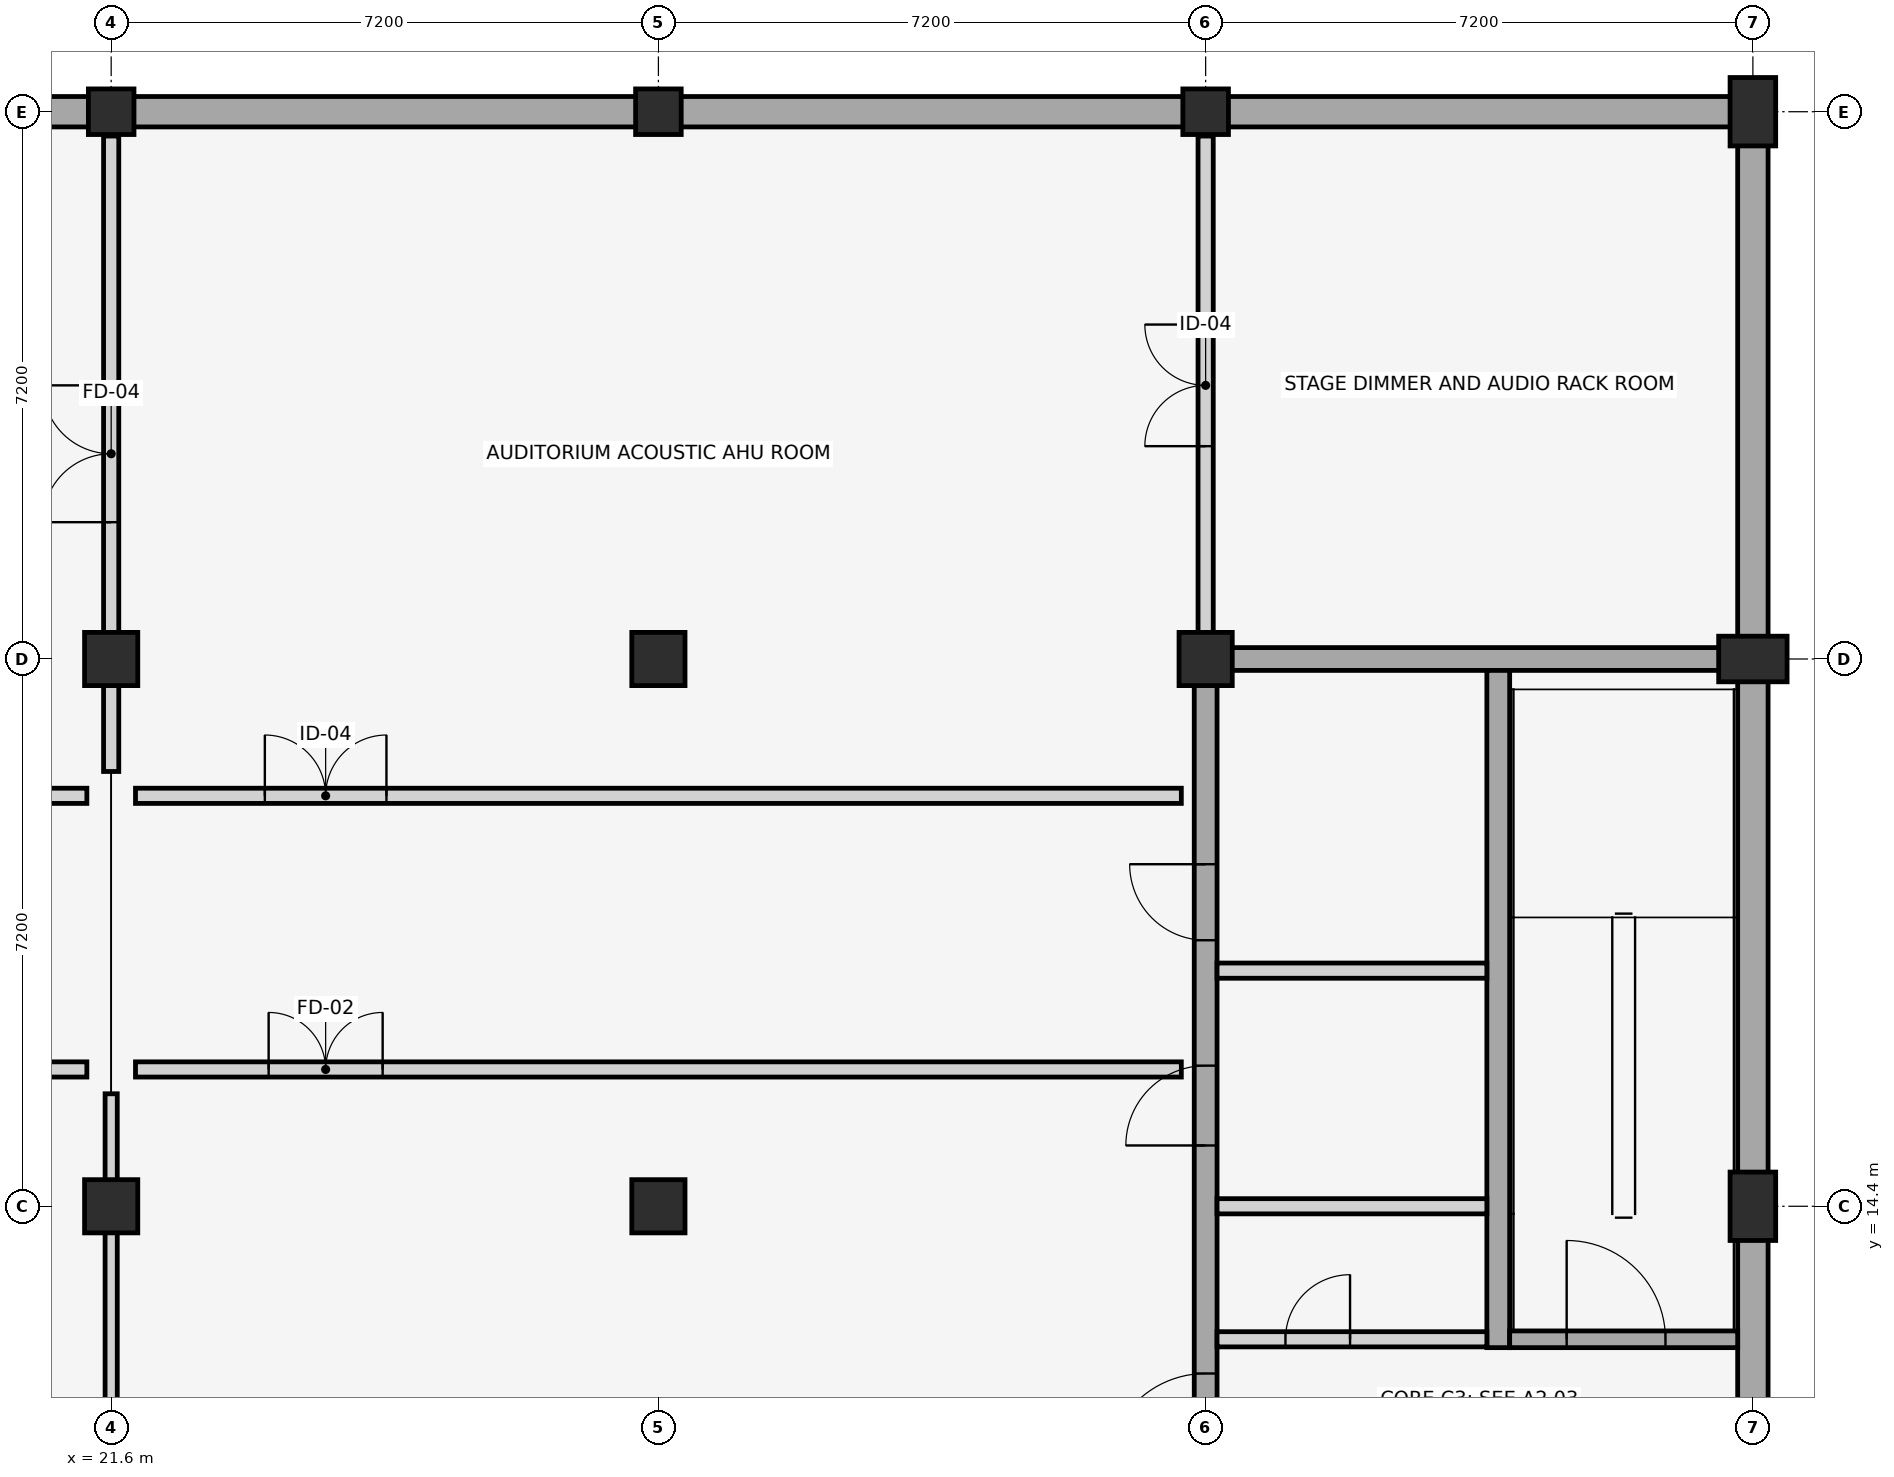
"""IFC4 building model, lengths in metres.
Left out: names, types, materials, properties, quantities, classifications, styles, units other than length and angle.
Written with IfcOpenShell. Run it as: python <this file> out.ifc"""

import sys

from ifc_helpers import new_model, si_unit, direction, frame, frame_2d, origin, origin_2d, place, context, subcontext, project, spatial, rectangle, extrude, element, fill, save


model = new_model("IFC4")
c1 = context("Model", 3, precision=1e-05, world=origin(), true_north=direction((0.0, 1.0)))
c2 = subcontext(c1, "Body", "Model", "MODEL_VIEW")
j1 = project(units=[si_unit("LENGTHUNIT", "METRE"), si_unit("PLANEANGLEUNIT", "RADIAN")], contexts=[c1])
p1 = place(None, origin())
s1 = spatial("IfcSite", under=j1, at=p1, CompositionType="ELEMENT")
p2 = place(p1, origin())
s2 = spatial("IfcBuilding", under=s1, at=p2, CompositionType="ELEMENT")
p3 = place(p2, frame((0.0, 0.0, -4.5)))
s3 = spatial("IfcBuildingStorey", under=s2, at=p3, CompositionType="ELEMENT", Elevation=-4.5)
p4 = place(p3, frame((43.2, 0.2, 0.0), z_axis=(0.0, 0.0, 1.0), x_axis=(0.0, 1.0, 0.0)))
e1 = element("IfcWall", 1, at=p4, inside=s3, PredefinedType="USERDEFINED", context=c2, shape_type="SweptSolid", body=[
    extrude(rectangle(XDim=28.4, YDim=0.4, at=frame_2d((14.2, 0.0))), origin(), (0.0, 0.0, 1.0), 3.67),
])
p5 = place(p3, frame((43.4, 28.8, 0.0), z_axis=(0.0, 0.0, 1.0), x_axis=(-1.0, 0.0, 0.0)))
e2 = element("IfcWall", 2, at=p5, inside=s3, PredefinedType="USERDEFINED", context=c2, shape_type="SweptSolid", body=[
    extrude(rectangle(XDim=43.6, YDim=0.4, at=frame_2d((21.8, 0.0))), origin(), (0.0, 0.0, 1.0), 3.67),
])
for number, where, z_axis, x_axis in (
    (3, (21.6, 14.4, -0.45), (0.0, 0.0, 1.0), (0.0, 1.0, 0.0)),
    (4, (21.6, 21.6, -0.45), (0.0, 0.0, 1.0), (1.0, 0.0, 0.0)),
):
    element("IfcColumn", number, at=place(p3, frame(where, z_axis=z_axis, x_axis=x_axis)), inside=s3, PredefinedType="COLUMN", context=c2, shape_type="SweptSolid", body=[
        extrude(rectangle(XDim=0.7, YDim=0.7, at=origin_2d()), origin(), (0.0, 0.0, 1.0), 4.95),
    ])
p6 = place(p3, frame((21.6, 28.8, -0.45), z_axis=(0.0, 0.0, 1.0), x_axis=(0.0, 1.0, 0.0)))
e5 = element("IfcColumn", 5, at=p6, inside=s3, PredefinedType="COLUMN", context=c2, shape_type="SweptSolid", body=[
    extrude(rectangle(XDim=0.6, YDim=0.6, at=origin_2d()), origin(), (0.0, 0.0, 1.0), 4.95),
])
for number, where, z_axis, x_axis in (
    (6, (28.8, 14.4, -0.45), (0.0, 0.0, 1.0), (1.0, 0.0, 0.0)),
    (7, (28.8, 21.6, -0.45), (0.0, 0.0, 1.0), (0.0, 1.0, 0.0)),
):
    element("IfcColumn", number, at=place(p3, frame(where, z_axis=z_axis, x_axis=x_axis)), inside=s3, PredefinedType="COLUMN", context=c2, shape_type="SweptSolid", body=[
        extrude(rectangle(XDim=0.7, YDim=0.7, at=origin_2d()), origin(), (0.0, 0.0, 1.0), 4.95),
    ])
p7 = place(p3, frame((28.8, 28.8, -0.45), z_axis=(0.0, 0.0, 1.0), x_axis=(1.0, 0.0, 0.0)))
e8 = element("IfcColumn", 8, at=p7, inside=s3, PredefinedType="COLUMN", context=c2, shape_type="SweptSolid", body=[
    extrude(rectangle(XDim=0.6, YDim=0.6, at=origin_2d()), origin(), (0.0, 0.0, 1.0), 4.95),
])
p8 = place(p3, frame((36.0, 21.6, -0.45), z_axis=(0.0, 0.0, 1.0), x_axis=(1.0, 0.0, 0.0)))
e9 = element("IfcColumn", 9, at=p8, inside=s3, PredefinedType="COLUMN", context=c2, shape_type="SweptSolid", body=[
    extrude(rectangle(XDim=0.7, YDim=0.7, at=origin_2d()), origin(), (0.0, 0.0, 1.0), 4.95),
])
p9 = place(p3, frame((36.0, 28.8, -0.45), z_axis=(0.0, 0.0, 1.0), x_axis=(0.0, 1.0, 0.0)))
e10 = element("IfcColumn", 10, at=p9, inside=s3, PredefinedType="COLUMN", context=c2, shape_type="SweptSolid", body=[
    extrude(rectangle(XDim=0.6, YDim=0.6, at=origin_2d()), origin(), (0.0, 0.0, 1.0), 4.95),
])
for number, where, z_axis, x_axis in (
    (11, (43.2, 14.4, -0.45), (0.0, 0.0, 1.0), (1.0, 0.0, 0.0)),
    (12, (43.2, 21.6, -0.45), (0.0, 0.0, 1.0), (0.0, 1.0, 0.0)),
    (13, (43.2, 28.8, -0.45), (0.0, 0.0, 1.0), (1.0, 0.0, 0.0)),
):
    element("IfcColumn", number, at=place(p3, frame(where, z_axis=z_axis, x_axis=x_axis)), inside=s3, PredefinedType="PILASTER", context=c2, shape_type="SweptSolid", body=[
        extrude(rectangle(XDim=0.6, YDim=0.9, at=origin_2d()), origin(), (0.0, 0.0, 1.0), 4.95),
    ])
p10 = place(p3, frame((35.85, 21.6, 0.0), z_axis=(0.0, 0.0, 1.0), x_axis=(1.0, 0.0, 0.0)))
e14 = element("IfcWall", 14, at=p10, inside=s3, PredefinedType="SHEAR", context=c2, shape_type="SweptSolid", body=[
    extrude(rectangle(XDim=7.15, YDim=0.3, at=frame_2d((3.575, 0.0))), origin(), (0.0, 0.0, 1.0), 4.25),
])
p11 = place(p3, frame((36.0, 7.35, 0.0), z_axis=(0.0, 0.0, 1.0), x_axis=(0.0, 1.0, 0.0)))
e15 = element("IfcWall", 15, at=p11, inside=s3, PredefinedType="SHEAR", context=c2, shape_type="SweptSolid", body=[
    extrude(rectangle(XDim=14.1, YDim=0.3, at=frame_2d((7.05, 0.0))), origin(), (0.0, 0.0, 1.0), 4.25),
])
p12 = place(p11, frame((3.55, 0.0, 0.0)))
e16 = element("IfcOpeningElement", 16, at=p12, cuts=e15, PredefinedType="OPENING", context=c2, shape_type="SweptSolid", body=[
    extrude(rectangle(XDim=1.3, YDim=2.2, at=frame_2d((0.65, 1.1))), frame((0.0, 0.16, 0.0), z_axis=(0.0, -1.0, 0.0), x_axis=(1.0, 0.0, 0.0)), (0.0, 0.0, 1.0), 0.32),
])
p13 = place(p11, frame((7.85, 0.0, 0.0)))
e17 = element("IfcOpeningElement", 17, at=p13, cuts=e15, PredefinedType="OPENING", context=c2, shape_type="SweptSolid", body=[
    extrude(rectangle(XDim=1.05, YDim=2.15, at=frame_2d((0.525, 1.075))), frame((0.0, 0.16, 0.0), z_axis=(0.0, -1.0, 0.0), x_axis=(1.0, 0.0, 0.0)), (0.0, 0.0, 1.0), 0.32),
])
p14 = place(p11, frame((10.55, 0.0, 0.0)))
e18 = element("IfcOpeningElement", 18, at=p14, cuts=e15, PredefinedType="OPENING", context=c2, shape_type="SweptSolid", body=[
    extrude(rectangle(XDim=1.0, YDim=2.15, at=frame_2d((0.5, 1.075))), frame((0.0, 0.16, 0.0), z_axis=(0.0, -1.0, 0.0), x_axis=(1.0, 0.0, 0.0)), (0.0, 0.0, 1.0), 0.32),
])
p15 = place(p3, frame((39.85, 12.54, 0.0), z_axis=(0.0, 0.0, 1.0), x_axis=(0.0, 1.0, 0.0)))
e19 = element("IfcWall", 19, at=p15, inside=s3, PredefinedType="SHEAR", context=c2, shape_type="SweptSolid", body=[
    extrude(rectangle(XDim=8.91, YDim=0.3, at=frame_2d((4.455, 0.0))), origin(), (0.0, 0.0, 1.0), 4.25),
])
p16 = place(p3, frame((36.15, 12.65, 0.0), z_axis=(0.0, 0.0, 1.0), x_axis=(1.0, 0.0, 0.0)))
e20 = element("IfcWall", 20, at=p16, inside=s3, PredefinedType="PLUMBINGWALL", context=c2, shape_type="SweptSolid", body=[
    extrude(rectangle(XDim=3.55, YDim=0.2, at=frame_2d((1.775, 0.0))), origin(), (0.0, 0.0, 1.0), 3.67),
])
p17 = place(p16, frame((0.9, 0.0, 0.0)))
e21 = element("IfcOpeningElement", 21, at=p17, cuts=e20, PredefinedType="OPENING", context=c2, shape_type="SweptSolid", body=[
    extrude(rectangle(XDim=0.85, YDim=2.05, at=frame_2d((0.425, 1.025))), frame((0.0, 0.11, 0.0), z_axis=(0.0, -1.0, 0.0), x_axis=(1.0, 0.0, 0.0)), (0.0, 0.0, 1.0), 0.22),
])
p18 = place(p3, frame((40.0, 12.65, 0.0), z_axis=(0.0, 0.0, 1.0), x_axis=(1.0, 0.0, 0.0)))
e22 = element("IfcWall", 22, at=p18, inside=s3, PredefinedType="SHEAR", context=c2, shape_type="SweptSolid", body=[
    extrude(rectangle(XDim=3.0, YDim=0.22, at=frame_2d((1.5, 0.0))), origin(), (0.0, 0.0, 1.0), 4.25),
])
p19 = place(p18, frame((0.75, 0.0, 0.0)))
e23 = element("IfcOpeningElement", 23, at=p19, cuts=e22, PredefinedType="OPENING", context=c2, shape_type="SweptSolid", body=[
    extrude(rectangle(XDim=1.3, YDim=2.2, at=frame_2d((0.65, 1.1))), frame((0.0, 0.12, 0.0), z_axis=(0.0, -1.0, 0.0), x_axis=(1.0, 0.0, 0.0)), (0.0, 0.0, 1.0), 0.24),
])
for number, where, z_axis, x_axis in (
    (24, (36.15, 14.4, 0.0), (0.0, 0.0, 1.0), (1.0, 0.0, 0.0)),
    (25, (36.15, 17.5, 0.0), (0.0, 0.0, 1.0), (1.0, 0.0, 0.0)),
):
    element("IfcWall", number, at=place(p3, frame(where, z_axis=z_axis, x_axis=x_axis)), inside=s3, PredefinedType="PLUMBINGWALL", context=c2, shape_type="SweptSolid", body=[
        extrude(rectangle(XDim=3.55, YDim=0.2, at=frame_2d((1.775, 0.0))), origin(), (0.0, 0.0, 1.0), 3.67),
    ])
p20 = place(p3, frame((7.52, 16.2, 0.0), z_axis=(0.0, 0.0, 1.0), x_axis=(1.0, 0.0, 0.0)))
e26 = element("IfcWall", 26, at=p20, inside=s3, PredefinedType="PARTITIONING", context=c2, shape_type="SweptSolid", body=[
    extrude(rectangle(XDim=13.76, YDim=0.2, at=frame_2d((6.88, 0.0))), origin(), (0.0, 0.0, 1.0), 3.45),
])
p21 = place(p20, frame((1.752, 0.0, 0.0)))
e27 = element("IfcOpeningElement", 27, at=p21, cuts=e26, PredefinedType="OPENING", context=c2, shape_type="SweptSolid", body=[
    extrude(rectangle(XDim=1.5, YDim=2.25, at=frame_2d((0.75, 1.125))), frame((0.0, 0.11, 0.0), z_axis=(0.0, -1.0, 0.0), x_axis=(1.0, 0.0, 0.0)), (0.0, 0.0, 1.0), 0.22),
])
p22 = place(p3, frame((7.52, 19.8, 0.0), z_axis=(0.0, 0.0, 1.0), x_axis=(1.0, 0.0, 0.0)))
e28 = element("IfcWall", 28, at=p22, inside=s3, PredefinedType="PARTITIONING", context=c2, shape_type="SweptSolid", body=[
    extrude(rectangle(XDim=13.76, YDim=0.2, at=frame_2d((6.88, 0.0))), origin(), (0.0, 0.0, 1.0), 3.45),
])
p23 = place(p22, frame((1.602, 0.0, 0.0)))
e29 = element("IfcOpeningElement", 29, at=p23, cuts=e28, PredefinedType="OPENING", context=c2, shape_type="SweptSolid", body=[
    extrude(rectangle(XDim=1.8, YDim=2.4, at=frame_2d((0.9, 1.2))), frame((0.0, 0.11, 0.0), z_axis=(0.0, -1.0, 0.0), x_axis=(1.0, 0.0, 0.0)), (0.0, 0.0, 1.0), 0.22),
])
p24 = place(p3, frame((21.92, 16.2, 0.0), z_axis=(0.0, 0.0, 1.0), x_axis=(1.0, 0.0, 0.0)))
e30 = element("IfcWall", 30, at=p24, inside=s3, PredefinedType="PARTITIONING", context=c2, shape_type="SweptSolid", body=[
    extrude(rectangle(XDim=13.76, YDim=0.2, at=frame_2d((6.88, 0.0))), origin(), (0.0, 0.0, 1.0), 3.45),
])
p25 = place(p24, frame((1.752, 0.0, 0.0)))
e31 = element("IfcOpeningElement", 31, at=p25, cuts=e30, PredefinedType="OPENING", context=c2, shape_type="SweptSolid", body=[
    extrude(rectangle(XDim=1.5, YDim=2.25, at=frame_2d((0.75, 1.125))), frame((0.0, 0.11, 0.0), z_axis=(0.0, -1.0, 0.0), x_axis=(1.0, 0.0, 0.0)), (0.0, 0.0, 1.0), 0.22),
])
p26 = place(p3, frame((21.92, 19.8, 0.0), z_axis=(0.0, 0.0, 1.0), x_axis=(1.0, 0.0, 0.0)))
e32 = element("IfcWall", 32, at=p26, inside=s3, PredefinedType="PARTITIONING", context=c2, shape_type="SweptSolid", body=[
    extrude(rectangle(XDim=13.76, YDim=0.2, at=frame_2d((6.88, 0.0))), origin(), (0.0, 0.0, 1.0), 3.45),
])
p27 = place(p26, frame((1.702, 0.0, 0.0)))
e33 = element("IfcOpeningElement", 33, at=p27, cuts=e32, PredefinedType="OPENING", context=c2, shape_type="SweptSolid", body=[
    extrude(rectangle(XDim=1.6, YDim=2.35, at=frame_2d((0.8, 1.175))), frame((0.0, 0.11, 0.0), z_axis=(0.0, -1.0, 0.0), x_axis=(1.0, 0.0, 0.0)), (0.0, 0.0, 1.0), 0.22),
])
p28 = place(p3, frame((21.6, 0.32, 0.0), z_axis=(0.0, 0.0, 1.0), x_axis=(0.0, 1.0, 0.0)))
e34 = element("IfcWall", 34, at=p28, inside=s3, PredefinedType="PARTITIONING", context=c2, shape_type="SweptSolid", body=[
    extrude(rectangle(XDim=15.56, YDim=0.16, at=frame_2d((7.78, 0.0))), origin(), (0.0, 0.0, 1.0), 3.45),
])
p29 = place(p28, frame((1.843, 0.0, 0.0)))
e35 = element("IfcOpeningElement", 35, at=p29, cuts=e34, PredefinedType="OPENING", context=c2, shape_type="SweptSolid", body=[
    extrude(rectangle(XDim=1.5, YDim=2.25, at=frame_2d((0.75, 1.125))), frame((0.0, 0.09, 0.0), z_axis=(0.0, -1.0, 0.0), x_axis=(1.0, 0.0, 0.0)), (0.0, 0.0, 1.0), 0.18),
])
p30 = place(p3, frame((21.6, 20.12, 0.0), z_axis=(0.0, 0.0, 1.0), x_axis=(0.0, 1.0, 0.0)))
e36 = element("IfcWall", 36, at=p30, inside=s3, PredefinedType="PARTITIONING", context=c2, shape_type="SweptSolid", body=[
    extrude(rectangle(XDim=8.36, YDim=0.2, at=frame_2d((4.18, 0.0))), origin(), (0.0, 0.0, 1.0), 3.45),
])
p31 = place(p30, frame((3.28, 0.0, 0.0)))
e37 = element("IfcOpeningElement", 37, at=p31, cuts=e36, PredefinedType="OPENING", context=c2, shape_type="SweptSolid", body=[
    extrude(rectangle(XDim=1.8, YDim=2.4, at=frame_2d((0.9, 1.2))), frame((0.0, 0.11, 0.0), z_axis=(0.0, -1.0, 0.0), x_axis=(1.0, 0.0, 0.0)), (0.0, 0.0, 1.0), 0.22),
])
p32 = place(p3, frame((36.0, 21.92, 0.0), z_axis=(0.0, 0.0, 1.0), x_axis=(0.0, 1.0, 0.0)))
e38 = element("IfcWall", 38, at=p32, inside=s3, PredefinedType="PARTITIONING", context=c2, shape_type="SweptSolid", body=[
    extrude(rectangle(XDim=6.56, YDim=0.2, at=frame_2d((3.28, 0.0))), origin(), (0.0, 0.0, 1.0), 3.45),
])
p33 = place(p32, frame((2.48, 0.0, 0.0)))
e39 = element("IfcOpeningElement", 39, at=p33, cuts=e38, PredefinedType="OPENING", context=c2, shape_type="SweptSolid", body=[
    extrude(rectangle(XDim=1.6, YDim=2.35, at=frame_2d((0.8, 1.175))), frame((0.0, 0.11, 0.0), z_axis=(0.0, -1.0, 0.0), x_axis=(1.0, 0.0, 0.0)), (0.0, 0.0, 1.0), 0.22),
])
p34 = place(p12, origin())
e40 = element("IfcDoor", 40, at=p34, inside=s3, OperationType="SINGLE_SWING_LEFT", PredefinedType="DOOR", context=c2, shape_type="SweptSolid", body=[
    extrude(rectangle(XDim=1.3, YDim=2.2, at=frame_2d((0.65, 1.1))), frame((0.0, 0.025, 0.0), z_axis=(0.0, -1.0, 0.0), x_axis=(1.0, 0.0, 0.0)), (0.0, 0.0, 1.0), 0.05),
])
fill(e16, e40)
p35 = place(p13, origin())
e41 = element("IfcDoor", 41, at=p35, inside=s3, OperationType="SINGLE_SWING_LEFT", PredefinedType="DOOR", context=c2, shape_type="SweptSolid", body=[
    extrude(rectangle(XDim=1.05, YDim=2.15, at=frame_2d((0.525, 1.075))), frame((0.0, 0.025, 0.0), z_axis=(0.0, -1.0, 0.0), x_axis=(1.0, 0.0, 0.0)), (0.0, 0.0, 1.0), 0.05),
])
fill(e17, e41)
p36 = place(p14, origin())
e42 = element("IfcDoor", 42, at=p36, inside=s3, OperationType="SINGLE_SWING_RIGHT", PredefinedType="DOOR", context=c2, shape_type="SweptSolid", body=[
    extrude(rectangle(XDim=1.0, YDim=2.15, at=frame_2d((0.5, 1.075))), frame((0.0, 0.025, 0.0), z_axis=(0.0, -1.0, 0.0), x_axis=(1.0, 0.0, 0.0)), (0.0, 0.0, 1.0), 0.05),
])
fill(e18, e42)
p37 = place(p17, origin())
e43 = element("IfcDoor", 43, at=p37, inside=s3, OperationType="SINGLE_SWING_RIGHT", PredefinedType="TRAPDOOR", context=c2, shape_type="SweptSolid", body=[
    extrude(rectangle(XDim=0.85, YDim=2.05, at=frame_2d((0.425, 1.025))), frame((0.0, 0.025, 0.0), z_axis=(0.0, -1.0, 0.0), x_axis=(1.0, 0.0, 0.0)), (0.0, 0.0, 1.0), 0.05),
])
fill(e21, e43)
p38 = place(p19, origin())
e44 = element("IfcDoor", 44, at=p38, inside=s3, OperationType="SINGLE_SWING_LEFT", PredefinedType="DOOR", context=c2, shape_type="SweptSolid", body=[
    extrude(rectangle(XDim=1.3, YDim=2.2, at=frame_2d((0.65, 1.1))), frame((0.0, 0.025, 0.0), z_axis=(0.0, -1.0, 0.0), x_axis=(1.0, 0.0, 0.0)), (0.0, 0.0, 1.0), 0.05),
])
fill(e23, e44)
p39 = place(p25, origin())
e45 = element("IfcDoor", 45, at=p39, inside=s3, OperationType="DOUBLE_DOOR_SINGLE_SWING", PredefinedType="DOOR", context=c2, shape_type="SweptSolid", body=[
    extrude(rectangle(XDim=1.5, YDim=2.25, at=frame_2d((0.75, 1.125))), frame((0.0, 0.025, 0.0), z_axis=(0.0, -1.0, 0.0), x_axis=(1.0, 0.0, 0.0)), (0.0, 0.0, 1.0), 0.05),
])
fill(e31, e45)
p40 = place(p27, origin())
e46 = element("IfcDoor", 46, at=p40, inside=s3, OperationType="DOUBLE_DOOR_SINGLE_SWING", PredefinedType="DOOR", context=c2, shape_type="SweptSolid", body=[
    extrude(rectangle(XDim=1.6, YDim=2.35, at=frame_2d((0.8, 1.175))), frame((0.0, 0.025, 0.0), z_axis=(0.0, -1.0, 0.0), x_axis=(1.0, 0.0, 0.0)), (0.0, 0.0, 1.0), 0.05),
])
fill(e33, e46)
p41 = place(p31, origin())
e47 = element("IfcDoor", 47, at=p41, inside=s3, OperationType="DOUBLE_DOOR_SINGLE_SWING", PredefinedType="DOOR", context=c2, shape_type="SweptSolid", body=[
    extrude(rectangle(XDim=1.8, YDim=2.4, at=frame_2d((0.9, 1.2))), frame((0.0, 0.025, 0.0), z_axis=(0.0, -1.0, 0.0), x_axis=(1.0, 0.0, 0.0)), (0.0, 0.0, 1.0), 0.05),
])
fill(e37, e47)
p42 = place(p33, origin())
e48 = element("IfcDoor", 48, at=p42, inside=s3, OperationType="DOUBLE_DOOR_SINGLE_SWING", PredefinedType="DOOR", context=c2, shape_type="SweptSolid", body=[
    extrude(rectangle(XDim=1.6, YDim=2.35, at=frame_2d((0.8, 1.175))), frame((0.0, 0.025, 0.0), z_axis=(0.0, -1.0, 0.0), x_axis=(1.0, 0.0, 0.0)), (0.0, 0.0, 1.0), 0.05),
])
fill(e39, e48)
save(model, sys.argv[1])
